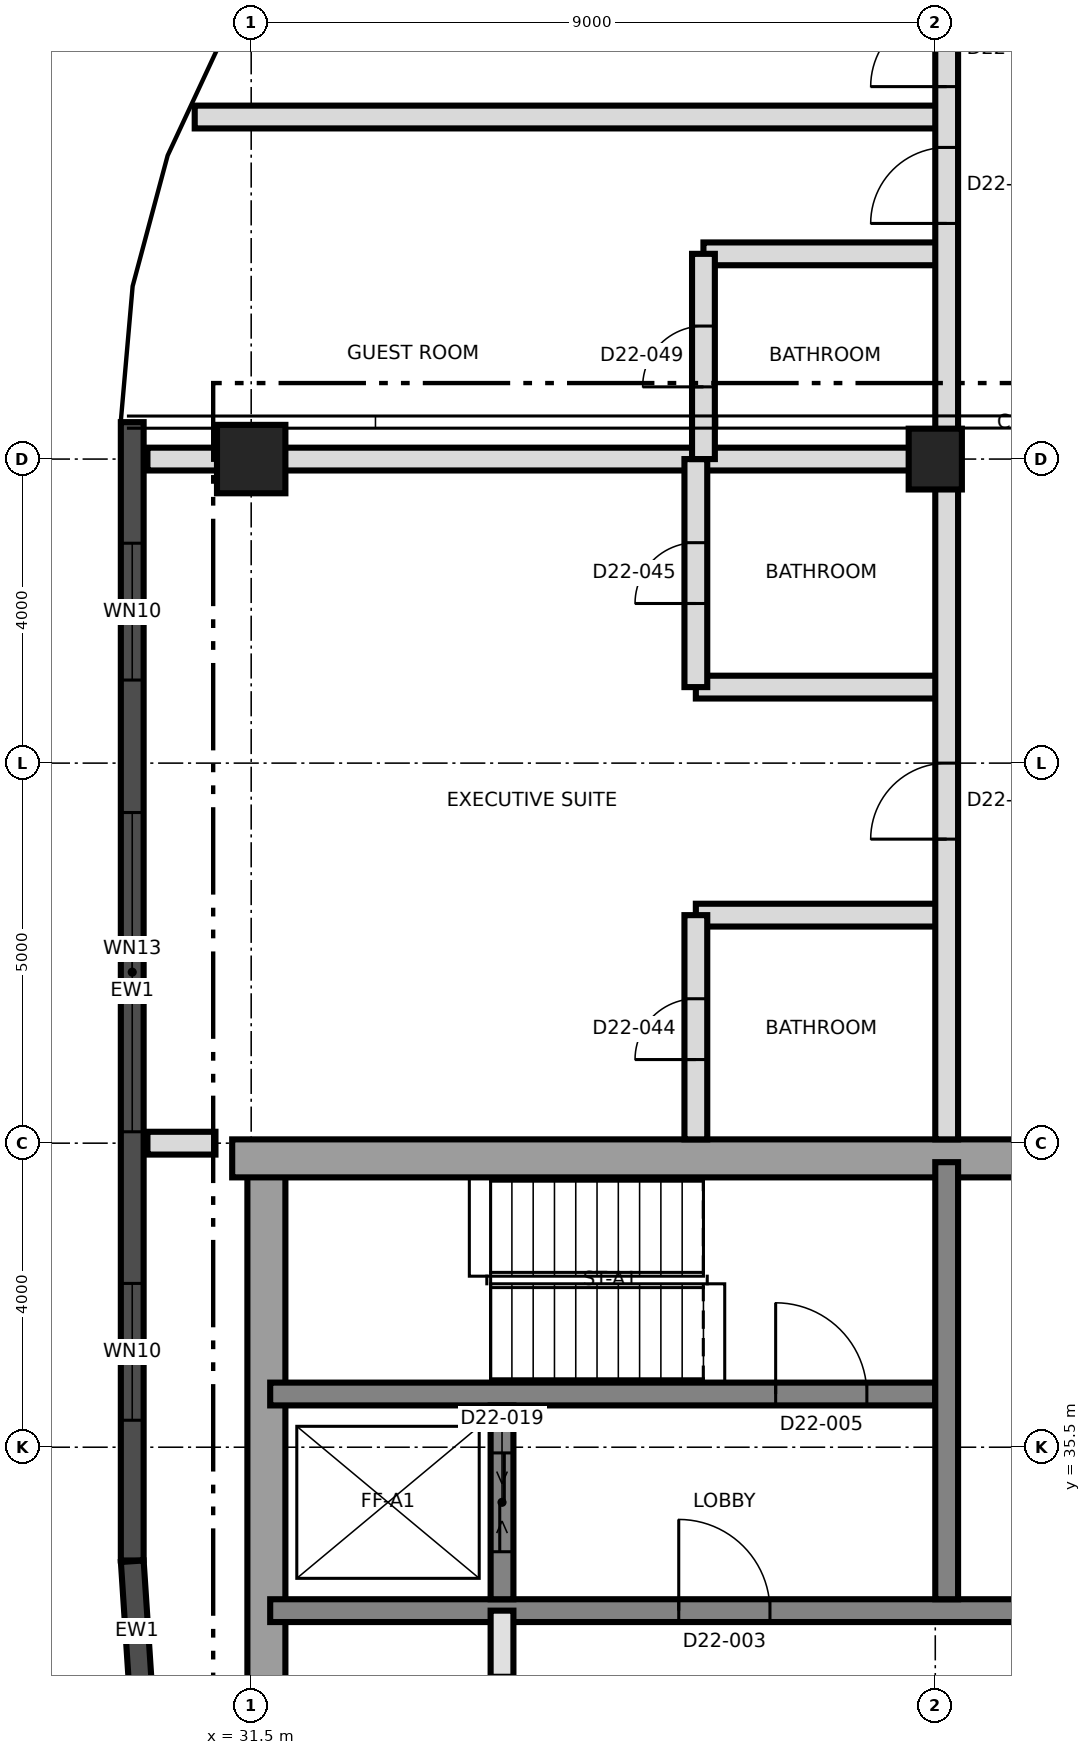
"""IFC4 building model, lengths in metres.
Left out: names, types, materials, properties, quantities, classifications, styles, units other than length and angle.
Written with IfcOpenShell. Run it as: python <this file> out.ifc"""

import sys

from ifc_helpers import new_model, si_unit, direction, frame, frame_2d, origin, origin_2d, place, context, subcontext, project, spatial, rectangle, extrude, element, fill, save


model = new_model("IFC4")
c1 = context("Model", 3, precision=1e-05, world=origin(), true_north=direction((0.0, 1.0)))
c2 = subcontext(c1, "Body", "Model", "MODEL_VIEW")
j1 = project(units=[si_unit("LENGTHUNIT", "METRE"), si_unit("PLANEANGLEUNIT", "RADIAN")], contexts=[c1])
p1 = place(None, origin())
s1 = spatial("IfcSite", under=j1, at=p1, CompositionType="ELEMENT")
p2 = place(p1, origin())
s2 = spatial("IfcBuilding", under=s1, at=p2, CompositionType="ELEMENT")
p3 = place(p2, frame((0.0, 0.0, 203.2)))
s3 = spatial("IfcBuildingStorey", under=s2, at=p3, CompositionType="ELEMENT", Elevation=203.2)
p4 = place(p3, frame((31.7, 21.75, 0.0), z_axis=(0.0, 0.0, 1.0), x_axis=(0.0, 1.0, 0.0)))
e1 = element("IfcWall", 1, at=p4, inside=s3, PredefinedType="SHEAR", context=c2, shape_type="SweptSolid", body=[
    extrude(rectangle(XDim=17.5, YDim=0.5, at=frame_2d((8.75, 0.0))), origin(), (0.0, 0.0, 1.0), 3.7),
])
p5 = place(p3, frame((31.25, 39.3, 0.0), z_axis=(0.0, 0.0, 1.0), x_axis=(1.0, 0.0, 0.0)))
e2 = element("IfcWall", 2, at=p5, inside=s3, PredefinedType="SHEAR", context=c2, shape_type="SweptSolid", body=[
    extrude(rectangle(XDim=27.0, YDim=0.5, at=frame_2d((13.5, 0.0))), origin(), (0.0, 0.0, 1.0), 3.7),
])
p6 = place(p5, frame((10.45, 0.0, 0.0)))
e3 = element("IfcOpeningElement", 3, at=p6, cuts=e2, PredefinedType="OPENING", context=c2, shape_type="SweptSolid", body=[
    extrude(rectangle(XDim=1.2, YDim=2.1, at=frame_2d((0.6, 1.05))), frame((0.0, 0.26, 0.0), z_axis=(0.0, -1.0, 0.0), x_axis=(1.0, 0.0, 0.0)), (0.0, 0.0, 1.0), 0.52),
])
p7 = place(p3, frame((31.75, 33.35, 0.0), z_axis=(0.0, 0.0, 1.0), x_axis=(1.0, 0.0, 0.0)))
e4 = element("IfcWall", 4, at=p7, inside=s3, PredefinedType="SHEAR", context=c2, shape_type="SweptSolid", body=[
    extrude(rectangle(XDim=26.5, YDim=0.3, at=frame_2d((13.25, 0.0))), origin(), (0.0, 0.0, 1.0), 3.7),
])
p8 = place(p7, frame((13.9, 0.0, 0.0)))
e5 = element("IfcOpeningElement", 5, at=p8, cuts=e4, PredefinedType="OPENING", context=c2, shape_type="SweptSolid", body=[
    extrude(rectangle(XDim=1.4, YDim=2.1, at=frame_2d((0.7, 1.05))), frame((0.0, 0.16, 0.0), z_axis=(0.0, -1.0, 0.0), x_axis=(1.0, 0.0, 0.0)), (0.0, 0.0, 1.0), 0.32),
])
p9 = place(p7, frame((5.375, 0.0, 0.0)))
e6 = element("IfcOpeningElement", 6, at=p9, cuts=e4, PredefinedType="OPENING", context=c2, shape_type="SweptSolid", body=[
    extrude(rectangle(XDim=1.2, YDim=2.1, at=frame_2d((0.6, 1.05))), frame((0.0, 0.16, 0.0), z_axis=(0.0, -1.0, 0.0), x_axis=(1.0, 0.0, 0.0)), (0.0, 0.0, 1.0), 0.32),
])
p10 = place(p7, frame((19.925, 0.0, 0.0)))
e7 = element("IfcOpeningElement", 7, at=p10, cuts=e4, PredefinedType="OPENING", context=c2, shape_type="SweptSolid", body=[
    extrude(rectangle(XDim=1.2, YDim=2.1, at=frame_2d((0.6, 1.05))), frame((0.0, 0.16, 0.0), z_axis=(0.0, -1.0, 0.0), x_axis=(1.0, 0.0, 0.0)), (0.0, 0.0, 1.0), 0.32),
])
p11 = place(p3, frame((31.75, 36.2, 0.0), z_axis=(0.0, 0.0, 1.0), x_axis=(1.0, 0.0, 0.0)))
e8 = element("IfcWall", 8, at=p11, inside=s3, PredefinedType="SHEAR", context=c2, shape_type="SweptSolid", body=[
    extrude(rectangle(XDim=8.75, YDim=0.3, at=frame_2d((4.375, 0.0))), origin(), (0.0, 0.0, 1.0), 3.7),
])
p12 = place(p11, frame((6.65, 0.0, 0.0)))
e9 = element("IfcOpeningElement", 9, at=p12, cuts=e8, PredefinedType="OPENING", context=c2, shape_type="SweptSolid", body=[
    extrude(rectangle(XDim=1.2, YDim=2.1, at=frame_2d((0.6, 1.05))), frame((0.0, 0.16, 0.0), z_axis=(0.0, -1.0, 0.0), x_axis=(1.0, 0.0, 0.0)), (0.0, 0.0, 1.0), 0.32),
])
p13 = place(p3, frame((40.65, 33.5, 0.0), z_axis=(0.0, 0.0, 1.0), x_axis=(0.0, 1.0, 0.0)))
e10 = element("IfcWall", 10, at=p13, inside=s3, PredefinedType="SHEAR", context=c2, shape_type="SweptSolid", body=[
    extrude(rectangle(XDim=5.75, YDim=0.3, at=frame_2d((2.875, 0.0))), origin(), (0.0, 0.0, 1.0), 3.7),
])
p14 = place(p3, frame((34.8, 33.5, 0.0), z_axis=(0.0, 0.0, 1.0), x_axis=(0.0, 1.0, 0.0)))
e11 = element("IfcWall", 11, at=p14, inside=s3, PredefinedType="SHEAR", context=c2, shape_type="SweptSolid", body=[
    extrude(rectangle(XDim=2.55, YDim=0.3, at=frame_2d((1.275, 0.0))), origin(), (0.0, 0.0, 1.0), 3.7),
])
p15 = place(p14, frame((0.625, 0.0, 0.0)))
e12 = element("IfcOpeningElement", 12, at=p15, cuts=e11, PredefinedType="OPENING", context=c2, shape_type="SweptSolid", body=[
    extrude(rectangle(XDim=1.3, YDim=2.4, at=frame_2d((0.65, 1.2))), frame((0.0, 0.16, 0.0), z_axis=(0.0, -1.0, 0.0), x_axis=(1.0, 0.0, 0.0)), (0.0, 0.0, 1.0), 0.32),
])
p16 = place(p3, frame((31.5, 48.5, 0.0), z_axis=(0.0, 0.0, 1.0), x_axis=(1.0, 0.0, 0.0)))
e13 = element("IfcColumn", 13, at=p16, inside=s3, PredefinedType="COLUMN", context=c2, shape_type="SweptSolid", body=[
    extrude(rectangle(XDim=0.9, YDim=0.9, at=origin_2d()), origin(), (0.0, 0.0, 1.0), 3.7),
])
p17 = place(p3, frame((40.5, 48.5, 0.0), z_axis=(0.0, 0.0, 1.0), x_axis=(0.0, 1.0, 0.0)))
e14 = element("IfcColumn", 14, at=p17, inside=s3, PredefinedType="COLUMN", context=c2, shape_type="SweptSolid", body=[
    extrude(rectangle(XDim=0.8, YDim=0.7, at=origin_2d()), origin(), (0.0, 0.0, 1.0), 3.7),
])
p18 = place(p3, frame((29.935, 48.986, 0.0), z_axis=(0.0, 0.0, 1.0), x_axis=(0.0, -1.0, 0.0)))
e15 = element("IfcWall", 15, at=p18, inside=s3, PredefinedType="SOLIDWALL", context=c2, shape_type="SweptSolid", body=[
    extrude(rectangle(XDim=14.976, YDim=0.3, at=frame_2d((7.488, 0.0))), origin(), (0.0, 0.0, 1.0), 3.4),
])
p19 = place(p18, frame((1.593, 0.0, 0.3)))
e16 = element("IfcOpeningElement", 16, at=p19, cuts=e15, PredefinedType="OPENING", context=c2, shape_type="SweptSolid", body=[
    extrude(rectangle(XDim=1.8, YDim=2.4, at=frame_2d((0.9, 1.2))), frame((0.0, 0.16, 0.0), z_axis=(0.0, -1.0, 0.0), x_axis=(1.0, 0.0, 0.0)), (0.0, 0.0, 1.0), 0.32),
])
p20 = place(p18, frame((5.136, 0.0, 0.9)))
e17 = element("IfcOpeningElement", 17, at=p20, cuts=e15, PredefinedType="OPENING", context=c2, shape_type="SweptSolid", body=[
    extrude(rectangle(XDim=4.2, YDim=1.7, at=frame_2d((2.1, 0.85))), frame((0.0, 0.16, 0.0), z_axis=(0.0, -1.0, 0.0), x_axis=(1.0, 0.0, 0.0)), (0.0, 0.0, 1.0), 0.32),
])
p21 = place(p18, frame((11.331, 0.0, 0.3)))
e18 = element("IfcOpeningElement", 18, at=p21, cuts=e15, PredefinedType="OPENING", context=c2, shape_type="SweptSolid", body=[
    extrude(rectangle(XDim=1.8, YDim=2.4, at=frame_2d((0.9, 1.2))), frame((0.0, 0.16, 0.0), z_axis=(0.0, -1.0, 0.0), x_axis=(1.0, 0.0, 0.0)), (0.0, 0.0, 1.0), 0.32),
])
p22 = place(p3, frame((29.935, 34.0, 0.0), z_axis=(0.0, 0.0, 1.0), x_axis=(0.065376617685, -0.997860660543, 0.0)))
e19 = element("IfcWall", 19, at=p22, inside=s3, PredefinedType="SOLIDWALL", context=c2, shape_type="SweptSolid", body=[
    extrude(rectangle(XDim=1.83, YDim=0.3, at=frame_2d((0.915, 0.0))), origin(), (0.0, 0.0, 1.0), 3.4),
])
p23 = place(p3, frame((34.8, 30.65, 0.0), z_axis=(0.0, 0.0, 1.0), x_axis=(0.0, 1.0, 0.0)))
e20 = element("IfcWall", 20, at=p23, inside=s3, PredefinedType="SOLIDWALL", context=c2, shape_type="SweptSolid", body=[
    extrude(rectangle(XDim=2.7, YDim=0.3, at=frame_2d((1.35, 0.0))), origin(), (0.0, 0.0, 1.0), 3.4),
])
p24 = place(p23, frame((0.85, 0.0, 0.0)))
e21 = element("IfcOpeningElement", 21, at=p24, cuts=e20, PredefinedType="OPENING", context=c2, shape_type="SweptSolid", body=[
    extrude(rectangle(XDim=1.0, YDim=2.1, at=frame_2d((0.5, 1.05))), frame((0.0, 0.16, 0.0), z_axis=(0.0, -1.0, 0.0), x_axis=(1.0, 0.0, 0.0)), (0.0, 0.0, 1.0), 0.32),
])
p25 = place(p3, frame((30.135, 39.5, 0.0), z_axis=(0.0, 0.0, 1.0), x_axis=(1.0, 0.0, 0.0)))
e22 = element("IfcWall", 22, at=p25, inside=s3, PredefinedType="PARTITIONING", context=c2, shape_type="SweptSolid", body=[
    extrude(rectangle(XDim=0.895, YDim=0.3, at=frame_2d((0.448, 0.0))), origin(), (0.0, 0.0, 1.0), 3.35),
])
for number, where, z_axis, x_axis in (
    (23, (37.35, 42.5, 0.0), (0.0, 0.0, 1.0), (1.0, 0.0, 0.0)),
    (24, (37.35, 45.5, 0.0), (0.0, 0.0, 1.0), (1.0, 0.0, 0.0)),
):
    element("IfcWall", number, at=place(p3, frame(where, z_axis=z_axis, x_axis=x_axis)), inside=s3, PredefinedType="PARTITIONING", context=c2, shape_type="SweptSolid", body=[
        extrude(rectangle(XDim=3.3, YDim=0.3, at=frame_2d((1.65, 0.0))), origin(), (0.0, 0.0, 1.0), 3.4),
    ])
p26 = place(p3, frame((30.135, 48.5, 0.0), z_axis=(0.0, 0.0, 1.0), x_axis=(1.0, 0.0, 0.0)))
e25 = element("IfcWall", 25, at=p26, inside=s3, PredefinedType="PARTITIONING", context=c2, shape_type="SweptSolid", body=[
    extrude(rectangle(XDim=10.515, YDim=0.3, at=frame_2d((5.257, 0.0))), origin(), (0.0, 0.0, 1.0), 3.35),
])
p27 = place(p3, frame((37.45, 51.2, 0.0), z_axis=(0.0, 0.0, 1.0), x_axis=(1.0, 0.0, 0.0)))
e26 = element("IfcWall", 26, at=p27, inside=s3, PredefinedType="PARTITIONING", context=c2, shape_type="SweptSolid", body=[
    extrude(rectangle(XDim=3.2, YDim=0.3, at=frame_2d((1.6, 0.0))), origin(), (0.0, 0.0, 1.0), 3.4),
])
p28 = place(p3, frame((30.757, 53.0, 0.0), z_axis=(0.0, 0.0, 1.0), x_axis=(1.0, 0.0, 0.0)))
e27 = element("IfcWall", 27, at=p28, inside=s3, PredefinedType="PARTITIONING", context=c2, shape_type="SweptSolid", body=[
    extrude(rectangle(XDim=9.893, YDim=0.3, at=frame_2d((4.946, 0.0))), origin(), (0.0, 0.0, 1.0), 3.35),
])
p29 = place(p3, frame((37.35, 39.55, 0.0), z_axis=(0.0, 0.0, 1.0), x_axis=(0.0, 1.0, 0.0)))
e28 = element("IfcWall", 28, at=p29, inside=s3, PredefinedType="PARTITIONING", context=c2, shape_type="SweptSolid", body=[
    extrude(rectangle(XDim=2.95, YDim=0.3, at=frame_2d((1.475, 0.0))), origin(), (0.0, 0.0, 1.0), 3.4),
])
p30 = place(p29, frame((1.05, 0.0, 0.0)))
e29 = element("IfcOpeningElement", 29, at=p30, cuts=e28, PredefinedType="OPENING", context=c2, shape_type="SweptSolid", body=[
    extrude(rectangle(XDim=0.8, YDim=2.1, at=frame_2d((0.4, 1.05))), frame((0.0, 0.16, 0.0), z_axis=(0.0, -1.0, 0.0), x_axis=(1.0, 0.0, 0.0)), (0.0, 0.0, 1.0), 0.32),
])
p31 = place(p3, frame((37.35, 45.5, 0.0), z_axis=(0.0, 0.0, 1.0), x_axis=(0.0, 1.0, 0.0)))
e30 = element("IfcWall", 30, at=p31, inside=s3, PredefinedType="PARTITIONING", context=c2, shape_type="SweptSolid", body=[
    extrude(rectangle(XDim=3.0, YDim=0.3, at=frame_2d((1.5, 0.0))), origin(), (0.0, 0.0, 1.0), 3.4),
])
p32 = place(p31, frame((1.1, 0.0, 0.0)))
e31 = element("IfcOpeningElement", 31, at=p32, cuts=e30, PredefinedType="OPENING", context=c2, shape_type="SweptSolid", body=[
    extrude(rectangle(XDim=0.8, YDim=2.1, at=frame_2d((0.4, 1.05))), frame((0.0, 0.16, 0.0), z_axis=(0.0, -1.0, 0.0), x_axis=(1.0, 0.0, 0.0)), (0.0, 0.0, 1.0), 0.32),
])
p33 = place(p3, frame((37.45, 48.5, 0.0), z_axis=(0.0, 0.0, 1.0), x_axis=(0.0, 1.0, 0.0)))
e32 = element("IfcWall", 32, at=p33, inside=s3, PredefinedType="PARTITIONING", context=c2, shape_type="SweptSolid", body=[
    extrude(rectangle(XDim=2.7, YDim=0.3, at=frame_2d((1.35, 0.0))), origin(), (0.0, 0.0, 1.0), 3.4),
])
p34 = place(p33, frame((0.95, 0.0, 0.0)))
e33 = element("IfcOpeningElement", 33, at=p34, cuts=e32, PredefinedType="OPENING", context=c2, shape_type="SweptSolid", body=[
    extrude(rectangle(XDim=0.8, YDim=2.1, at=frame_2d((0.4, 1.05))), frame((0.0, 0.16, 0.0), z_axis=(0.0, -1.0, 0.0), x_axis=(1.0, 0.0, 0.0)), (0.0, 0.0, 1.0), 0.32),
])
p35 = place(p3, frame((40.65, 39.55, 0.0), z_axis=(0.0, 0.0, 1.0), x_axis=(0.0, 1.0, 0.0)))
e34 = element("IfcWall", 34, at=p35, inside=s3, PredefinedType="PARTITIONING", context=c2, shape_type="SweptSolid", body=[
    extrude(rectangle(XDim=19.0, YDim=0.3, at=frame_2d((9.5, 0.0))), origin(), (0.0, 0.0, 1.0), 3.35),
])
p36 = place(p35, frame((3.95, 0.0, 0.0)))
e35 = element("IfcOpeningElement", 35, at=p36, cuts=e34, PredefinedType="OPENING", context=c2, shape_type="SweptSolid", body=[
    extrude(rectangle(XDim=1.0, YDim=2.4, at=frame_2d((0.5, 1.2))), frame((0.0, 0.16, 0.0), z_axis=(0.0, -1.0, 0.0), x_axis=(1.0, 0.0, 0.0)), (0.0, 0.0, 1.0), 0.32),
])
p37 = place(p35, frame((12.05, 0.0, 0.0)))
e36 = element("IfcOpeningElement", 36, at=p37, cuts=e34, PredefinedType="OPENING", context=c2, shape_type="SweptSolid", body=[
    extrude(rectangle(XDim=1.0, YDim=2.1, at=frame_2d((0.5, 1.05))), frame((0.0, 0.16, 0.0), z_axis=(0.0, -1.0, 0.0), x_axis=(1.0, 0.0, 0.0)), (0.0, 0.0, 1.0), 0.32),
])
p38 = place(p35, frame((13.85, 0.0, 0.0)))
e37 = element("IfcOpeningElement", 37, at=p38, cuts=e34, PredefinedType="OPENING", context=c2, shape_type="SweptSolid", body=[
    extrude(rectangle(XDim=1.0, YDim=2.1, at=frame_2d((0.5, 1.05))), frame((0.0, 0.16, 0.0), z_axis=(0.0, -1.0, 0.0), x_axis=(1.0, 0.0, 0.0)), (0.0, 0.0, 1.0), 0.32),
])
p39 = place(p19, origin())
e38 = element("IfcWindow", 38, at=p39, inside=s3, PartitioningType="SINGLE_PANEL", PredefinedType="WINDOW", context=c2, shape_type="SweptSolid", body=[
    extrude(rectangle(XDim=1.8, YDim=2.4, at=frame_2d((0.9, 1.2))), frame((0.0, 0.03, 0.0), z_axis=(0.0, -1.0, 0.0), x_axis=(1.0, 0.0, 0.0)), (0.0, 0.0, 1.0), 0.06),
])
fill(e16, e38)
p40 = place(p20, origin())
e39 = element("IfcWindow", 39, at=p40, inside=s3, PartitioningType="SINGLE_PANEL", PredefinedType="WINDOW", context=c2, shape_type="SweptSolid", body=[
    extrude(rectangle(XDim=4.2, YDim=1.7, at=frame_2d((2.1, 0.85))), frame((0.0, 0.03, 0.0), z_axis=(0.0, -1.0, 0.0), x_axis=(1.0, 0.0, 0.0)), (0.0, 0.0, 1.0), 0.06),
])
fill(e17, e39)
p41 = place(p21, origin())
e40 = element("IfcWindow", 40, at=p41, inside=s3, PartitioningType="SINGLE_PANEL", PredefinedType="WINDOW", context=c2, shape_type="SweptSolid", body=[
    extrude(rectangle(XDim=1.8, YDim=2.4, at=frame_2d((0.9, 1.2))), frame((0.0, 0.03, 0.0), z_axis=(0.0, -1.0, 0.0), x_axis=(1.0, 0.0, 0.0)), (0.0, 0.0, 1.0), 0.06),
])
fill(e18, e40)
p42 = place(p9, origin())
e41 = element("IfcDoor", 41, at=p42, inside=s3, OperationType="SINGLE_SWING_LEFT", PredefinedType="DOOR", context=c2, shape_type="SweptSolid", body=[
    extrude(rectangle(XDim=1.2, YDim=2.1, at=frame_2d((0.6, 1.05))), frame((0.0, 0.025, 0.0), z_axis=(0.0, -1.0, 0.0), x_axis=(1.0, 0.0, 0.0)), (0.0, 0.0, 1.0), 0.05),
])
fill(e6, e41)
p43 = place(p12, origin())
e42 = element("IfcDoor", 42, at=p43, inside=s3, OperationType="SINGLE_SWING_RIGHT", PredefinedType="DOOR", context=c2, shape_type="SweptSolid", body=[
    extrude(rectangle(XDim=1.2, YDim=2.1, at=frame_2d((0.6, 1.05))), frame((0.0, 0.025, 0.0), z_axis=(0.0, -1.0, 0.0), x_axis=(1.0, 0.0, 0.0)), (0.0, 0.0, 1.0), 0.05),
])
fill(e9, e42)
p44 = place(p15, origin())
e43 = element("IfcDoor", 43, at=p44, inside=s3, OperationType="SLIDING_TO_LEFT", PredefinedType="DOOR", context=c2, shape_type="SweptSolid", body=[
    extrude(rectangle(XDim=1.3, YDim=2.4, at=frame_2d((0.65, 1.2))), frame((0.0, 0.025, 0.0), z_axis=(0.0, -1.0, 0.0), x_axis=(1.0, 0.0, 0.0)), (0.0, 0.0, 1.0), 0.05),
])
fill(e12, e43)
p45 = place(p30, origin())
e44 = element("IfcDoor", 44, at=p45, inside=s3, OperationType="SINGLE_SWING_LEFT", PredefinedType="DOOR", context=c2, shape_type="SweptSolid", body=[
    extrude(rectangle(XDim=0.8, YDim=2.1, at=frame_2d((0.4, 1.05))), frame((0.0, 0.025, 0.0), z_axis=(0.0, -1.0, 0.0), x_axis=(1.0, 0.0, 0.0)), (0.0, 0.0, 1.0), 0.05),
])
fill(e29, e44)
p46 = place(p32, origin())
e45 = element("IfcDoor", 45, at=p46, inside=s3, OperationType="SINGLE_SWING_RIGHT", PredefinedType="DOOR", context=c2, shape_type="SweptSolid", body=[
    extrude(rectangle(XDim=0.8, YDim=2.1, at=frame_2d((0.4, 1.05))), frame((0.0, 0.025, 0.0), z_axis=(0.0, -1.0, 0.0), x_axis=(1.0, 0.0, 0.0)), (0.0, 0.0, 1.0), 0.05),
])
fill(e31, e45)
p47 = place(p36, origin())
e46 = element("IfcDoor", 46, at=p47, inside=s3, OperationType="SINGLE_SWING_LEFT", PredefinedType="DOOR", context=c2, shape_type="SweptSolid", body=[
    extrude(rectangle(XDim=1.0, YDim=2.4, at=frame_2d((0.5, 1.2))), frame((0.0, 0.025, 0.0), z_axis=(0.0, -1.0, 0.0), x_axis=(1.0, 0.0, 0.0)), (0.0, 0.0, 1.0), 0.05),
])
fill(e35, e46)
p48 = place(p34, origin())
e47 = element("IfcDoor", 47, at=p48, inside=s3, OperationType="SINGLE_SWING_LEFT", PredefinedType="DOOR", context=c2, shape_type="SweptSolid", body=[
    extrude(rectangle(XDim=0.8, YDim=2.1, at=frame_2d((0.4, 1.05))), frame((0.0, 0.025, 0.0), z_axis=(0.0, -1.0, 0.0), x_axis=(1.0, 0.0, 0.0)), (0.0, 0.0, 1.0), 0.05),
])
fill(e33, e47)
p49 = place(p37, origin())
e48 = element("IfcDoor", 48, at=p49, inside=s3, OperationType="SINGLE_SWING_RIGHT", PredefinedType="DOOR", context=c2, shape_type="SweptSolid", body=[
    extrude(rectangle(XDim=1.0, YDim=2.1, at=frame_2d((0.5, 1.05))), frame((0.0, 0.025, 0.0), z_axis=(0.0, -1.0, 0.0), x_axis=(1.0, 0.0, 0.0)), (0.0, 0.0, 1.0), 0.05),
])
fill(e36, e48)
p50 = place(p38, origin())
e49 = element("IfcDoor", 49, at=p50, inside=s3, OperationType="SINGLE_SWING_LEFT", PredefinedType="DOOR", context=c2, shape_type="SweptSolid", body=[
    extrude(rectangle(XDim=1.0, YDim=2.1, at=frame_2d((0.5, 1.05))), frame((0.0, 0.025, 0.0), z_axis=(0.0, -1.0, 0.0), x_axis=(1.0, 0.0, 0.0)), (0.0, 0.0, 1.0), 0.05),
])
fill(e37, e49)
save(model, sys.argv[1])
